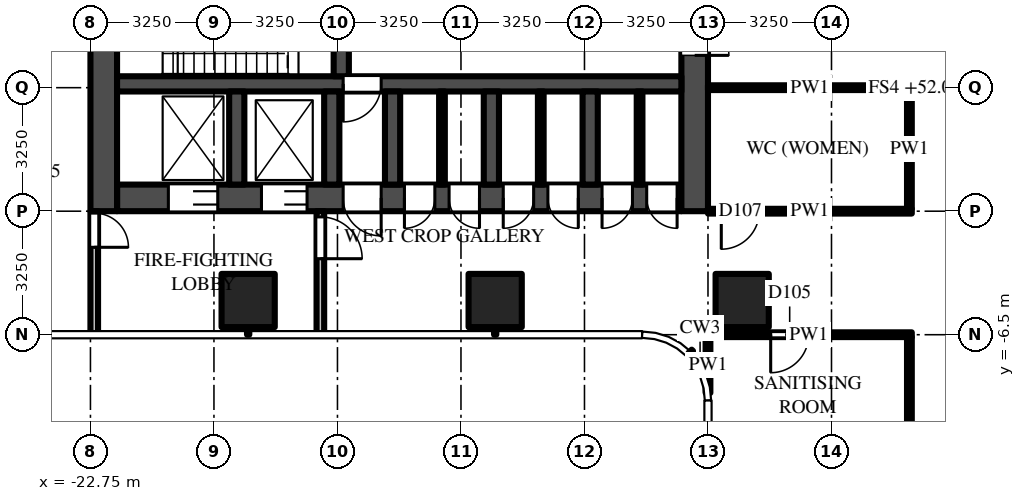
"""IFC4 building model, lengths in metres.
Left out: names, types, materials, properties, quantities, classifications, styles, units other than length and angle.
Written with IfcOpenShell. Run it as: python <this file> out.ifc"""

import sys

from ifc_helpers import new_model, si_unit, direction, frame, frame_2d, origin, origin_2d, place, context, subcontext, project, spatial, rectangle, extrude, source, transform, mapped, element, fill, save


model = new_model("IFC4")
c1 = context("Model", 3, precision=1e-05, world=origin(), true_north=direction((0.0, 1.0)))
c2 = subcontext(c1, "Body", "Model", "MODEL_VIEW")
j1 = project(units=[si_unit("LENGTHUNIT", "METRE"), si_unit("PLANEANGLEUNIT", "RADIAN")], contexts=[c1])
p1 = place(None, origin())
s1 = spatial("IfcSite", under=j1, at=p1, CompositionType="ELEMENT")
p2 = place(p1, origin())
s2 = spatial("IfcBuilding", under=s1, at=p2, CompositionType="ELEMENT")
p3 = place(p2, frame((0.0, 0.0, 52.0)))
s3 = spatial("IfcBuildingStorey", under=s2, at=p3, CompositionType="ELEMENT", Elevation=52.0)
m1 = source(origin(), c2, "Body", "SweptSolid", [
    extrude(rectangle(XDim=1.4, YDim=1.4, at=origin_2d()), origin(), (0.0, 0.0, 1.0), 4.5),
])
for number, where, z_axis, x_axis in (
    (1, (-5.6, -5.6, 0.0), (0.0, 0.0, 1.0), (1.0, 0.0, 0.0)),
    (2, (-12.1, -5.6, 0.0), (0.0, 0.0, 1.0), (1.0, 0.0, 0.0)),
    (3, (-18.6, -5.6, 0.0), (0.0, 0.0, 1.0), (1.0, 0.0, 0.0)),
):
    element("IfcColumn", number, at=place(p3, frame(where, z_axis=z_axis, x_axis=x_axis)), inside=s3, PredefinedType="COLUMN", context=c2, shape_type="MappedRepresentation", body=[
        mapped(m1, transform((0.0, 0.0, 0.0))),
    ])
m2 = source(origin(), c2, "Body", "SweptSolid", [
    extrude(rectangle(XDim=14.85, YDim=0.7, at=frame_2d((7.425, 0.0))), origin(), (0.0, 0.0, 1.0), 4.25),
])
p4 = place(p3, frame((-7.2, -2.9, 0.0), z_axis=(0.0, 0.0, 1.0), x_axis=(-1.0, 0.0, 0.0)))
e4 = element("IfcWall", 4, at=p4, inside=s3, PredefinedType="SHEAR", context=c2, shape_type="MappedRepresentation", body=[
    mapped(m2, transform((0.0, 0.0, 0.0))),
])
m3 = source(origin(), c2, "Body", "SweptSolid", [
    extrude(rectangle(XDim=1.3, YDim=2.1, at=frame_2d((0.65, 1.05))), frame((0.0, 0.36, 0.0), z_axis=(0.0, -1.0, 0.0), x_axis=(1.0, 0.0, 0.0)), (0.0, 0.0, 1.0), 0.72),
])
p5 = place(p4, frame((12.2, 0.0, 0.0)))
e5 = element("IfcOpeningElement", 5, at=p5, cuts=e4, PredefinedType="OPENING", context=c2, shape_type="MappedRepresentation", body=[
    mapped(m3, transform((0.0, 0.0, 0.0))),
])
m4 = source(origin(), c2, "Body", "SweptSolid", [
    extrude(rectangle(XDim=1.2, YDim=2.1, at=frame_2d((0.6, 1.05))), frame((0.0, 0.36, 0.0), z_axis=(0.0, -1.0, 0.0), x_axis=(1.0, 0.0, 0.0)), (0.0, 0.0, 1.0), 0.72),
])
p6 = place(p4, frame((9.85, 0.0, 0.0)))
e6 = element("IfcOpeningElement", 6, at=p6, cuts=e4, PredefinedType="OPENING", context=c2, shape_type="MappedRepresentation", body=[
    mapped(m4, transform((0.0, 0.0, 0.0))),
])
m5 = source(origin(), c2, "Body", "SweptSolid", [
    extrude(rectangle(XDim=1.0, YDim=2.1, at=frame_2d((0.5, 1.05))), frame((0.0, 0.36, 0.0), z_axis=(0.0, -1.0, 0.0), x_axis=(1.0, 0.0, 0.0)), (0.0, 0.0, 1.0), 0.72),
])
p7 = place(p4, frame((7.9, 0.0, 0.0)))
e7 = element("IfcOpeningElement", 7, at=p7, cuts=e4, PredefinedType="OPENING", context=c2, shape_type="MappedRepresentation", body=[
    mapped(m5, transform((0.0, 0.0, 0.0))),
])
m6 = source(origin(), c2, "Body", "SweptSolid", [
    extrude(rectangle(XDim=0.8, YDim=2.1, at=frame_2d((0.4, 1.05))), frame((0.0, 0.36, 0.0), z_axis=(0.0, -1.0, 0.0), x_axis=(1.0, 0.0, 0.0)), (0.0, 0.0, 1.0), 0.72),
])
p8 = place(p4, frame((0.113, 0.0, 0.0)))
e8 = element("IfcOpeningElement", 8, at=p8, cuts=e4, PredefinedType="OPENING", context=c2, shape_type="MappedRepresentation", body=[
    mapped(m6, transform((0.0, 0.0, 0.0))),
])
p9 = place(p4, frame((1.288, 0.0, 0.0)))
e9 = element("IfcOpeningElement", 9, at=p9, cuts=e4, PredefinedType="OPENING", context=c2, shape_type="MappedRepresentation", body=[
    mapped(m6, transform((0.0, 0.0, 0.0))),
])
p10 = place(p4, frame((2.712, 0.0, 0.0)))
e10 = element("IfcOpeningElement", 10, at=p10, cuts=e4, PredefinedType="OPENING", context=c2, shape_type="MappedRepresentation", body=[
    mapped(m6, transform((0.0, 0.0, 0.0))),
])
p11 = place(p4, frame((3.887, 0.0, 0.0)))
e11 = element("IfcOpeningElement", 11, at=p11, cuts=e4, PredefinedType="OPENING", context=c2, shape_type="MappedRepresentation", body=[
    mapped(m6, transform((0.0, 0.0, 0.0))),
])
p12 = place(p4, frame((5.312, 0.0, 0.0)))
e12 = element("IfcOpeningElement", 12, at=p12, cuts=e4, PredefinedType="OPENING", context=c2, shape_type="MappedRepresentation", body=[
    mapped(m6, transform((0.0, 0.0, 0.0))),
])
p13 = place(p4, frame((6.488, 0.0, 0.0)))
e13 = element("IfcOpeningElement", 13, at=p13, cuts=e4, PredefinedType="OPENING", context=c2, shape_type="MappedRepresentation", body=[
    mapped(m6, transform((0.0, 0.0, 0.0))),
])
m7 = source(origin(), c2, "Body", "SweptSolid", [
    extrude(rectangle(XDim=9.05, YDim=0.7, at=frame_2d((4.525, 0.0))), origin(), (0.0, 0.0, 1.0), 4.25),
])
p14 = place(p3, frame((-6.85, 5.8, 0.0), z_axis=(0.0, 0.0, 1.0), x_axis=(0.0, -1.0, 0.0)))
e14 = element("IfcWall", 14, at=p14, inside=s3, PredefinedType="SHEAR", context=c2, shape_type="MappedRepresentation", body=[
    mapped(m7, transform((0.0, 0.0, 0.0))),
])
m8 = source(origin(), c2, "Body", "SweptSolid", [
    extrude(rectangle(XDim=1.8, YDim=2.1, at=frame_2d((0.9, 1.05))), frame((0.0, 0.36, 0.0), z_axis=(0.0, -1.0, 0.0), x_axis=(1.0, 0.0, 0.0)), (0.0, 0.0, 1.0), 0.72),
])
p15 = place(p14, frame((3.15, 0.0, 0.0)))
e15 = element("IfcOpeningElement", 15, at=p15, cuts=e14, PredefinedType="OPENING", context=c2, shape_type="MappedRepresentation", body=[
    mapped(m8, transform((0.0, 0.0, 0.0))),
])
p16 = place(p3, frame((-22.4, 5.8, 0.0), z_axis=(0.0, 0.0, 1.0), x_axis=(0.0, -1.0, 0.0)))
e16 = element("IfcWall", 16, at=p16, inside=s3, PredefinedType="SHEAR", context=c2, shape_type="MappedRepresentation", body=[
    mapped(m7, transform((0.0, 0.0, 0.0))),
])
m9 = source(origin(), c2, "Body", "SweptSolid", [
    extrude(rectangle(XDim=14.85, YDim=0.4, at=frame_2d((7.425, 0.0))), origin(), (0.0, 0.0, 1.0), 4.25),
])
p17 = place(p3, frame((-7.2, 0.1, 0.0), z_axis=(0.0, 0.0, 1.0), x_axis=(-1.0, 0.0, 0.0)))
e17 = element("IfcWall", 17, at=p17, inside=s3, PredefinedType="SHEAR", context=c2, shape_type="MappedRepresentation", body=[
    mapped(m9, transform((0.0, 0.0, 0.0))),
])
m10 = source(origin(), c2, "Body", "SweptSolid", [
    extrude(rectangle(XDim=1.0, YDim=2.1, at=frame_2d((0.5, 1.05))), frame((0.0, 0.21, 0.0), z_axis=(0.0, -1.0, 0.0), x_axis=(1.0, 0.0, 0.0)), (0.0, 0.0, 1.0), 0.42),
])
p18 = place(p17, frame((7.9, 0.0, 0.0)))
e18 = element("IfcOpeningElement", 18, at=p18, cuts=e17, PredefinedType="OPENING", context=c2, shape_type="MappedRepresentation", body=[
    mapped(m10, transform((0.0, 0.0, 0.0))),
])
m11 = source(origin(), c2, "Body", "SweptSolid", [
    extrude(rectangle(XDim=5.5, YDim=0.4, at=frame_2d((2.75, 0.0))), origin(), (0.0, 0.0, 1.0), 4.25),
])
p19 = place(p3, frame((-16.15, 5.8, 0.0), z_axis=(0.0, 0.0, 1.0), x_axis=(0.0, -1.0, 0.0)))
e19 = element("IfcWall", 19, at=p19, inside=s3, PredefinedType="SHEAR", context=c2, shape_type="MappedRepresentation", body=[
    mapped(m11, transform((0.0, 0.0, 0.0))),
])
m12 = source(origin(), c2, "Body", "SweptSolid", [
    extrude(rectangle(XDim=1.1, YDim=2.1, at=frame_2d((0.55, 1.05))), frame((0.0, 0.21, 0.0), z_axis=(0.0, -1.0, 0.0), x_axis=(1.0, 0.0, 0.0)), (0.0, 0.0, 1.0), 0.42),
])
p20 = place(p19, frame((0.725, 0.0, 0.0)))
e20 = element("IfcOpeningElement", 20, at=p20, cuts=e19, PredefinedType="OPENING", context=c2, shape_type="MappedRepresentation", body=[
    mapped(m12, transform((0.0, 0.0, 0.0))),
])
p21 = place(p19, frame((3.675, 0.0, 0.0)))
e21 = element("IfcOpeningElement", 21, at=p21, cuts=e19, PredefinedType="OPENING", context=c2, shape_type="MappedRepresentation", body=[
    mapped(m12, transform((0.0, 0.0, 0.0))),
])
m13 = source(origin(), c2, "Body", "SweptSolid", [
    extrude(rectangle(XDim=2.45, YDim=0.4, at=frame_2d((1.225, 0.0))), origin(), (0.0, 0.0, 1.0), 4.25),
])
for number, where, z_axis, x_axis in (
    (22, (-9.6, -0.1, 0.0), (0.0, 0.0, 1.0), (0.0, -1.0, 0.0)),
    (23, (-12.2, -0.1, 0.0), (0.0, 0.0, 1.0), (0.0, -1.0, 0.0)),
    (24, (-14.8, -0.1, 0.0), (0.0, 0.0, 1.0), (0.0, -1.0, 0.0)),
    (25, (-16.4, -0.1, 0.0), (0.0, 0.0, 1.0), (0.0, -1.0, 0.0)),
    (26, (-18.9, -0.1, 0.0), (0.0, 0.0, 1.0), (0.0, -1.0, 0.0)),
):
    element("IfcWall", number, at=place(p3, frame(where, z_axis=z_axis, x_axis=x_axis)), inside=s3, PredefinedType="SHEAR", context=c2, shape_type="MappedRepresentation", body=[
        mapped(m13, transform((0.0, 0.0, 0.0))),
    ])
m14 = source(origin(), c2, "Body", "SweptSolid", [
    extrude(rectangle(XDim=3.25, YDim=0.2, at=frame_2d((1.625, 0.0))), origin(), (0.0, 0.0, 1.0), 4.25),
])
p22 = place(p3, frame((-16.7, -3.25, 0.0), z_axis=(0.0, 0.0, 1.0), x_axis=(0.0, -1.0, 0.0)))
e27 = element("IfcWall", 27, at=p22, inside=s3, PredefinedType="PARTITIONING", context=c2, shape_type="MappedRepresentation", body=[
    mapped(m14, transform((0.0, 0.0, 0.0))),
])
m15 = source(origin(), c2, "Body", "SweptSolid", [
    extrude(rectangle(XDim=1.1, YDim=2.1, at=frame_2d((0.55, 1.05))), frame((0.0, 0.11, 0.0), z_axis=(0.0, -1.0, 0.0), x_axis=(1.0, 0.0, 0.0)), (0.0, 0.0, 1.0), 0.22),
])
p23 = place(p22, frame((0.15, 0.0, 0.0)))
e28 = element("IfcOpeningElement", 28, at=p23, cuts=e27, PredefinedType="OPENING", context=c2, shape_type="MappedRepresentation", body=[
    mapped(m15, transform((0.0, 0.0, 0.0))),
])
p24 = place(p3, frame((-22.65, -3.25, 0.0), z_axis=(0.0, 0.0, 1.0), x_axis=(0.0, -1.0, 0.0)))
e29 = element("IfcWall", 29, at=p24, inside=s3, PredefinedType="PARTITIONING", context=c2, shape_type="MappedRepresentation", body=[
    mapped(m14, transform((0.0, 0.0, 0.0))),
])
m16 = source(origin(), c2, "Body", "SweptSolid", [
    extrude(rectangle(XDim=0.9, YDim=2.1, at=frame_2d((0.45, 1.05))), frame((0.0, 0.11, 0.0), z_axis=(0.0, -1.0, 0.0), x_axis=(1.0, 0.0, 0.0)), (0.0, 0.0, 1.0), 0.22),
])
p25 = place(p24, frame((0.05, 0.0, 0.0)))
e30 = element("IfcOpeningElement", 30, at=p25, cuts=e29, PredefinedType="OPENING", context=c2, shape_type="MappedRepresentation", body=[
    mapped(m16, transform((0.0, 0.0, 0.0))),
])
m17 = source(origin(), c2, "Body", "SweptSolid", [
    extrude(rectangle(XDim=2.45, YDim=0.15, at=frame_2d((1.225, 0.0))), origin(), (0.0, 0.0, 1.0), 4.25),
])
for number, where, z_axis, x_axis in (
    (31, (-8.3, -0.1, 0.0), (0.0, 0.0, 1.0), (0.0, -1.0, 0.0)),
    (32, (-10.9, -0.1, 0.0), (0.0, 0.0, 1.0), (0.0, -1.0, 0.0)),
    (33, (-13.5, -0.1, 0.0), (0.0, 0.0, 1.0), (0.0, -1.0, 0.0)),
):
    element("IfcWall", number, at=place(p3, frame(where, z_axis=z_axis, x_axis=x_axis)), inside=s3, PredefinedType="PARTITIONING", context=c2, shape_type="MappedRepresentation", body=[
        mapped(m17, transform((0.0, 0.0, 0.0))),
    ])
m18 = source(origin(), c2, "Body", "SweptSolid", [
    extrude(rectangle(XDim=1.469, YDim=0.125, at=frame_2d((0.734, 0.0))), origin(), (0.0, 0.0, 1.0), 4.25),
])
p26 = place(p3, frame((-6.5, -6.562, 0.0), z_axis=(0.0, 0.0, 1.0), x_axis=(0.0, -1.0, 0.0)))
e34 = element("IfcWall", 34, at=p26, inside=s3, PredefinedType="PARTITIONING", context=c2, shape_type="MappedRepresentation", body=[
    mapped(m18, transform((0.0, 0.0, 0.0))),
])
m19 = source(origin(), c2, "Body", "SweptSolid", [
    extrude(rectangle(XDim=5.475, YDim=0.125, at=frame_2d((2.738, 0.0))), origin(), (0.0, 0.0, 1.0), 3.468),
])
p27 = place(p3, frame((-1.2, -6.562, 0.0), z_axis=(0.0, 0.0, 1.0), x_axis=(0.0, -1.0, 0.0)))
e35 = element("IfcWall", 35, at=p27, inside=s3, PredefinedType="PARTITIONING", context=c2, shape_type="MappedRepresentation", body=[
    mapped(m19, transform((0.0, 0.0, 0.0))),
])
m20 = source(origin(), c2, "Body", "SweptSolid", [
    extrude(rectangle(XDim=1.0, YDim=2.1, at=frame_2d((0.5, 1.05))), frame((0.0, 0.073, 0.0), z_axis=(0.0, -1.0, 0.0), x_axis=(1.0, 0.0, 0.0)), (0.0, 0.0, 1.0), 0.145),
])
p28 = place(p27, frame((3.538, 0.0, 0.0)))
e36 = element("IfcOpeningElement", 36, at=p28, cuts=e35, PredefinedType="OPENING", context=c2, shape_type="MappedRepresentation", body=[
    mapped(m20, transform((0.0, 0.0, 0.0))),
])
m21 = source(origin(), c2, "Body", "SweptSolid", [
    extrude(rectangle(XDim=3.125, YDim=0.125, at=frame_2d((1.562, 0.0))), origin(), (0.0, 0.0, 1.0), 3.546),
])
p29 = place(p3, frame((-1.2, -0.062, 0.0), z_axis=(0.0, 0.0, 1.0), x_axis=(0.0, -1.0, 0.0)))
e37 = element("IfcWall", 37, at=p29, inside=s3, PredefinedType="PARTITIONING", context=c2, shape_type="MappedRepresentation", body=[
    mapped(m21, transform((0.0, 0.0, 0.0))),
])
m22 = source(origin(), c2, "Body", "SweptSolid", [
    extrude(rectangle(XDim=5.425, YDim=0.125, at=frame_2d((2.712, 0.0))), origin(), (0.0, 0.0, 1.0), 3.33),
])
p30 = place(p3, frame((-1.137, -6.5, 0.0), z_axis=(0.0, 0.0, 1.0), x_axis=(-1.0, 0.0, 0.0)))
e38 = element("IfcWall", 38, at=p30, inside=s3, PredefinedType="PARTITIONING", context=c2, shape_type="MappedRepresentation", body=[
    mapped(m22, transform((0.0, 0.0, 0.0))),
])
p31 = place(p30, frame((2.712, 0.0, 0.0)))
e39 = element("IfcOpeningElement", 39, at=p31, cuts=e38, PredefinedType="OPENING", context=c2, shape_type="MappedRepresentation", body=[
    mapped(m20, transform((0.0, 0.0, 0.0))),
])
m23 = source(origin(), c2, "Body", "SweptSolid", [
    extrude(rectangle(XDim=5.363, YDim=0.125, at=frame_2d((2.681, 0.0))), origin(), (0.0, 0.0, 1.0), 3.468),
])
p32 = place(p3, frame((-1.137, -3.25, 0.0), z_axis=(0.0, 0.0, 1.0), x_axis=(-1.0, 0.0, 0.0)))
e40 = element("IfcWall", 40, at=p32, inside=s3, PredefinedType="PARTITIONING", context=c2, shape_type="MappedRepresentation", body=[
    mapped(m23, transform((0.0, 0.0, 0.0))),
])
p33 = place(p32, frame((4.012, 0.0, 0.0)))
e41 = element("IfcOpeningElement", 41, at=p33, cuts=e40, PredefinedType="OPENING", context=c2, shape_type="MappedRepresentation", body=[
    mapped(m20, transform((0.0, 0.0, 0.0))),
])
p34 = place(p3, frame((-1.137, 0.0, 0.0), z_axis=(0.0, 0.0, 1.0), x_axis=(-1.0, 0.0, 0.0)))
e42 = element("IfcWall", 42, at=p34, inside=s3, PredefinedType="PARTITIONING", context=c2, shape_type="MappedRepresentation", body=[
    mapped(m23, transform((0.0, 0.0, 0.0))),
])
m24 = source(origin(), c2, "Body", "SweptSolid", [
    extrude(rectangle(XDim=1.3, YDim=2.1, at=frame_2d((0.65, 1.05))), frame((0.0, -0.275, 0.0), z_axis=(0.0, -1.0, 0.0), x_axis=(1.0, 0.0, 0.0)), (0.0, 0.0, 1.0), 0.05),
])
p35 = place(p5, origin())
e43 = element("IfcDoor", 43, at=p35, inside=s3, OperationType="DOUBLE_DOOR_SLIDING", PredefinedType="DOOR", context=c2, shape_type="MappedRepresentation", body=[
    mapped(m24, transform((0.0, 0.0, 0.0))),
])
fill(e5, e43)
m25 = source(origin(), c2, "Body", "SweptSolid", [
    extrude(rectangle(XDim=1.2, YDim=2.1, at=frame_2d((0.6, 1.05))), frame((0.0, -0.275, 0.0), z_axis=(0.0, -1.0, 0.0), x_axis=(1.0, 0.0, 0.0)), (0.0, 0.0, 1.0), 0.05),
])
p36 = place(p6, origin())
e44 = element("IfcDoor", 44, at=p36, inside=s3, OperationType="DOUBLE_DOOR_SLIDING", PredefinedType="DOOR", context=c2, shape_type="MappedRepresentation", body=[
    mapped(m25, transform((0.0, 0.0, 0.0))),
])
fill(e6, e44)
m26 = source(origin(), c2, "Body", "SweptSolid", [
    extrude(rectangle(XDim=1.8, YDim=2.1, at=frame_2d((0.9, 1.05))), frame((0.0, -0.275, 0.0), z_axis=(0.0, -1.0, 0.0), x_axis=(1.0, 0.0, 0.0)), (0.0, 0.0, 1.0), 0.05),
])
p37 = place(p15, origin())
e45 = element("IfcDoor", 45, at=p37, inside=s3, OperationType="DOUBLE_DOOR_SINGLE_SWING", PredefinedType="DOOR", context=c2, shape_type="MappedRepresentation", body=[
    mapped(m26, transform((0.0, 0.0, 0.0))),
])
fill(e15, e45)
m27 = source(origin(), c2, "Body", "SweptSolid", [
    extrude(rectangle(XDim=1.0, YDim=2.1, at=frame_2d((0.5, 1.05))), frame((0.0, 0.025, 0.0), z_axis=(0.0, -1.0, 0.0), x_axis=(1.0, 0.0, 0.0)), (0.0, 0.0, 1.0), 0.05),
])
p38 = place(p18, origin())
e46 = element("IfcDoor", 46, at=p38, inside=s3, OperationType="SINGLE_SWING_RIGHT", PredefinedType="DOOR", context=c2, shape_type="MappedRepresentation", body=[
    mapped(m27, transform((0.0, 0.0, 0.0))),
])
fill(e18, e46)
m28 = source(origin(), c2, "Body", "SweptSolid", [
    extrude(rectangle(XDim=1.0, YDim=2.1, at=frame_2d((0.5, 1.05))), frame((0.0, -0.275, 0.0), z_axis=(0.0, -1.0, 0.0), x_axis=(1.0, 0.0, 0.0)), (0.0, 0.0, 1.0), 0.05),
])
p39 = place(p7, origin())
e47 = element("IfcDoor", 47, at=p39, inside=s3, OperationType="SINGLE_SWING_LEFT", PredefinedType="DOOR", context=c2, shape_type="MappedRepresentation", body=[
    mapped(m28, transform((0.0, 0.0, 0.0))),
])
fill(e7, e47)
m29 = source(origin(), c2, "Body", "SweptSolid", [
    extrude(rectangle(XDim=1.1, YDim=2.1, at=frame_2d((0.55, 1.05))), frame((0.0, 0.025, 0.0), z_axis=(0.0, -1.0, 0.0), x_axis=(1.0, 0.0, 0.0)), (0.0, 0.0, 1.0), 0.05),
])
p40 = place(p23, origin())
e48 = element("IfcDoor", 48, at=p40, inside=s3, OperationType="SINGLE_SWING_RIGHT", PredefinedType="DOOR", context=c2, shape_type="MappedRepresentation", body=[
    mapped(m29, transform((0.0, 0.0, 0.0))),
])
fill(e28, e48)
m30 = source(origin(), c2, "Body", "SweptSolid", [
    extrude(rectangle(XDim=0.9, YDim=2.1, at=frame_2d((0.45, 1.05))), frame((0.0, 0.025, 0.0), z_axis=(0.0, -1.0, 0.0), x_axis=(1.0, 0.0, 0.0)), (0.0, 0.0, 1.0), 0.05),
])
p41 = place(p25, origin())
e49 = element("IfcDoor", 49, at=p41, inside=s3, OperationType="SINGLE_SWING_RIGHT", PredefinedType="DOOR", context=c2, shape_type="MappedRepresentation", body=[
    mapped(m30, transform((0.0, 0.0, 0.0))),
])
fill(e30, e49)
m31 = source(origin(), c2, "Body", "SweptSolid", [
    extrude(rectangle(XDim=0.8, YDim=2.1, at=frame_2d((0.4, 1.05))), frame((0.0, -0.275, 0.0), z_axis=(0.0, -1.0, 0.0), x_axis=(1.0, 0.0, 0.0)), (0.0, 0.0, 1.0), 0.05),
])
p42 = place(p8, origin())
e50 = element("IfcDoor", 50, at=p42, inside=s3, OperationType="SINGLE_SWING_LEFT", PredefinedType="DOOR", context=c2, shape_type="MappedRepresentation", body=[
    mapped(m31, transform((0.0, 0.0, 0.0))),
])
fill(e8, e50)
p43 = place(p9, origin())
e51 = element("IfcDoor", 51, at=p43, inside=s3, OperationType="SINGLE_SWING_RIGHT", PredefinedType="DOOR", context=c2, shape_type="MappedRepresentation", body=[
    mapped(m31, transform((0.0, 0.0, 0.0))),
])
fill(e9, e51)
p44 = place(p10, origin())
e52 = element("IfcDoor", 52, at=p44, inside=s3, OperationType="SINGLE_SWING_LEFT", PredefinedType="DOOR", context=c2, shape_type="MappedRepresentation", body=[
    mapped(m31, transform((0.0, 0.0, 0.0))),
])
fill(e10, e52)
p45 = place(p11, origin())
e53 = element("IfcDoor", 53, at=p45, inside=s3, OperationType="SINGLE_SWING_RIGHT", PredefinedType="DOOR", context=c2, shape_type="MappedRepresentation", body=[
    mapped(m31, transform((0.0, 0.0, 0.0))),
])
fill(e11, e53)
p46 = place(p12, origin())
e54 = element("IfcDoor", 54, at=p46, inside=s3, OperationType="SINGLE_SWING_LEFT", PredefinedType="DOOR", context=c2, shape_type="MappedRepresentation", body=[
    mapped(m31, transform((0.0, 0.0, 0.0))),
])
fill(e12, e54)
p47 = place(p13, origin())
e55 = element("IfcDoor", 55, at=p47, inside=s3, OperationType="SINGLE_SWING_RIGHT", PredefinedType="DOOR", context=c2, shape_type="MappedRepresentation", body=[
    mapped(m31, transform((0.0, 0.0, 0.0))),
])
fill(e13, e55)
p48 = place(p31, origin())
e56 = element("IfcDoor", 56, at=p48, inside=s3, OperationType="SINGLE_SWING_RIGHT", PredefinedType="DOOR", context=c2, shape_type="MappedRepresentation", body=[
    mapped(m27, transform((0.0, 0.0, 0.0))),
])
fill(e39, e56)
p49 = place(p33, origin())
e57 = element("IfcDoor", 57, at=p49, inside=s3, OperationType="SINGLE_SWING_RIGHT", PredefinedType="DOOR", context=c2, shape_type="MappedRepresentation", body=[
    mapped(m27, transform((0.0, 0.0, 0.0))),
])
fill(e41, e57)
save(model, sys.argv[1])
